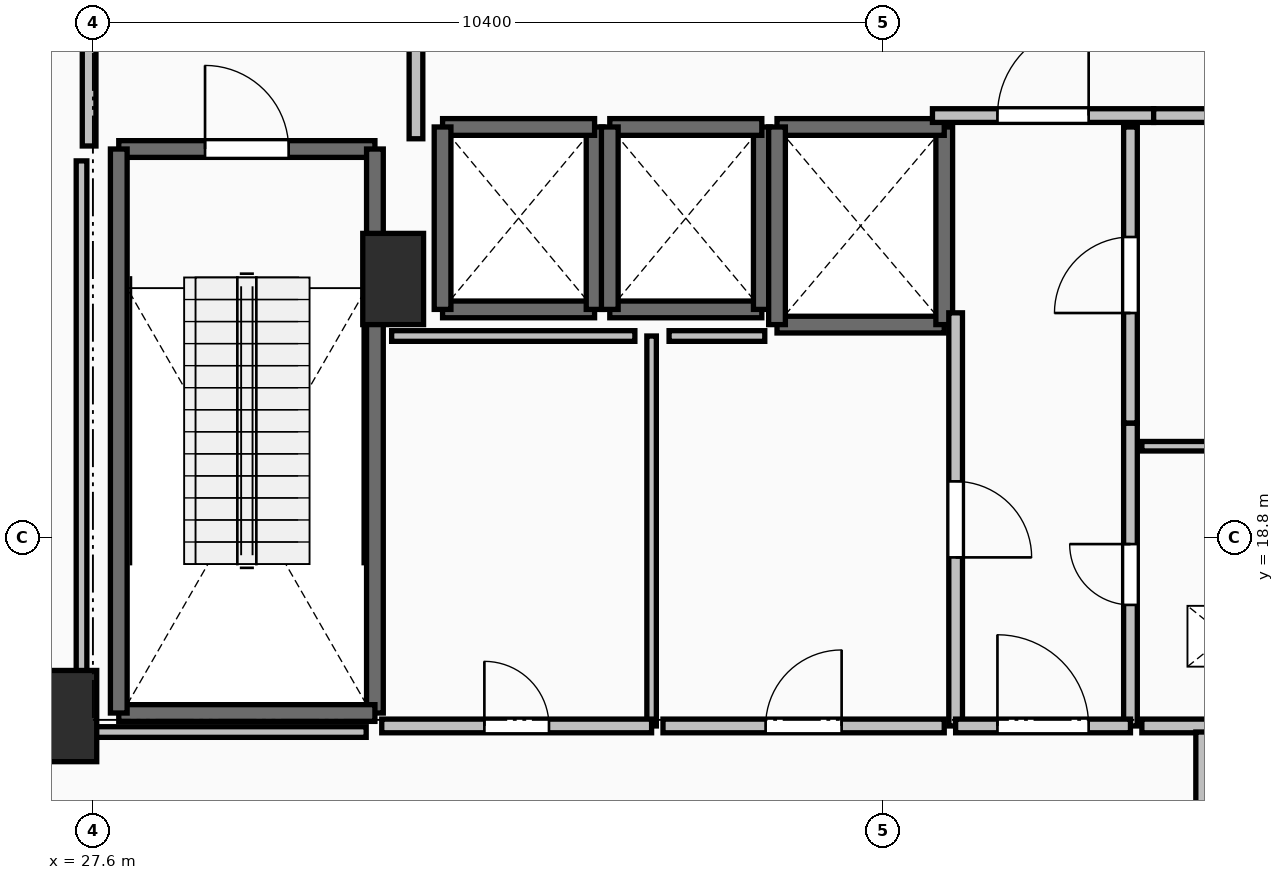
"""IFC4 building model, lengths in metres.
Left out: names, types, materials, properties, quantities, classifications, styles, units other than length and angle.
Written with IfcOpenShell. Run it as: python <this file> out.ifc"""

import sys

from ifc_helpers import new_model, si_unit, direction, frame, frame_2d, origin, origin_2d, place, context, subcontext, project, spatial, rectangle, extrude, element, fill, save


model = new_model("IFC4")
c1 = context("Model", 3, precision=1e-05, world=origin(), true_north=direction((0.0, 1.0)))
c2 = subcontext(c1, "Body", "Model", "MODEL_VIEW")
j1 = project(units=[si_unit("LENGTHUNIT", "METRE"), si_unit("PLANEANGLEUNIT", "RADIAN")], contexts=[c1])
p1 = place(None, origin())
s1 = spatial("IfcSite", under=j1, at=p1, CompositionType="ELEMENT")
p2 = place(p1, origin())
s2 = spatial("IfcBuilding", under=s1, at=p2, CompositionType="ELEMENT")
p3 = place(p2, frame((0.0, 0.0, 14.4)))
s3 = spatial("IfcBuildingStorey", under=s2, at=p3, CompositionType="ELEMENT", Elevation=14.4)
for number, where, z_axis, x_axis in (
    (1, (27.25, 16.45, 0.0), (0.0, 0.0, 1.0), (1.0, 0.0, 0.0)),
    (2, (31.55, 22.2, 0.0), (0.0, 0.0, 1.0), (1.0, 0.0, 0.0)),
):
    element("IfcColumn", number, at=place(p3, frame(where, z_axis=z_axis, x_axis=x_axis)), inside=s3, PredefinedType="PILASTER", context=c2, shape_type="SweptSolid", body=[
        extrude(rectangle(XDim=0.8, YDim=1.2, at=origin_2d()), origin(), (0.0, 0.0, 1.0), 4.8),
    ])
p4 = place(p3, frame((27.94, 23.91, 0.0), z_axis=(0.0, 0.0, 1.0), x_axis=(1.0, 0.0, 0.0)))
e3 = element("IfcWall", 3, at=p4, inside=s3, PredefinedType="SOLIDWALL", context=c2, shape_type="SweptSolid", body=[
    extrude(rectangle(XDim=3.37, YDim=0.22, at=frame_2d((1.685, 0.0))), origin(), (0.0, 0.0, 1.0), 4.48),
])
p5 = place(p4, frame((1.135, 0.0, 0.0)))
e4 = element("IfcOpeningElement", 4, at=p5, cuts=e3, PredefinedType="OPENING", context=c2, shape_type="SweptSolid", body=[
    extrude(rectangle(XDim=1.1, YDim=2.15, at=frame_2d((0.55, 1.075))), frame((0.0, 0.125, 0.0), z_axis=(0.0, -1.0, 0.0), x_axis=(1.0, 0.0, 0.0)), (0.0, 0.0, 1.0), 0.25),
])
p6 = place(p3, frame((31.31, 23.91, 0.0), z_axis=(0.0, 0.0, 1.0), x_axis=(0.0, -1.0, 0.0)))
e5 = element("IfcWall", 5, at=p6, inside=s3, PredefinedType="SOLIDWALL", context=c2, shape_type="SweptSolid", body=[
    extrude(rectangle(XDim=7.42, YDim=0.22, at=frame_2d((3.71, 0.0))), origin(), (0.0, 0.0, 1.0), 4.48),
])
p7 = place(p3, frame((31.31, 16.49, 0.0), z_axis=(0.0, 0.0, 1.0), x_axis=(-1.0, 0.0, 0.0)))
e6 = element("IfcWall", 6, at=p7, inside=s3, PredefinedType="SOLIDWALL", context=c2, shape_type="SweptSolid", body=[
    extrude(rectangle(XDim=3.37, YDim=0.22, at=frame_2d((1.685, 0.0))), origin(), (0.0, 0.0, 1.0), 4.48),
])
p8 = place(p3, frame((27.94, 16.49, 0.0), z_axis=(0.0, 0.0, 1.0), x_axis=(0.0, 1.0, 0.0)))
e7 = element("IfcWall", 7, at=p8, inside=s3, PredefinedType="SOLIDWALL", context=c2, shape_type="SweptSolid", body=[
    extrude(rectangle(XDim=7.42, YDim=0.22, at=frame_2d((3.71, 0.0))), origin(), (0.0, 0.0, 1.0), 4.48),
])
p9 = place(p3, frame((32.2, 21.8, 0.0), z_axis=(0.0, 0.0, 1.0), x_axis=(1.0, 0.0, 0.0)))
e8 = element("IfcWall", 8, at=p9, inside=s3, PredefinedType="SOLIDWALL", context=c2, shape_type="SweptSolid", body=[
    extrude(rectangle(XDim=2.0, YDim=0.22, at=frame_2d((1.0, 0.0))), origin(), (0.0, 0.0, 1.0), 4.48),
])
p10 = place(p3, frame((34.2, 21.8, 0.0), z_axis=(0.0, 0.0, 1.0), x_axis=(0.0, 1.0, 0.0)))
e9 = element("IfcWall", 9, at=p10, inside=s3, PredefinedType="SOLIDWALL", context=c2, shape_type="SweptSolid", body=[
    extrude(rectangle(XDim=2.4, YDim=0.22, at=frame_2d((1.2, 0.0))), origin(), (0.0, 0.0, 1.0), 4.48),
])
p11 = place(p3, frame((34.2, 24.2, 0.0), z_axis=(0.0, 0.0, 1.0), x_axis=(-1.0, 0.0, 0.0)))
e10 = element("IfcWall", 10, at=p11, inside=s3, PredefinedType="SOLIDWALL", context=c2, shape_type="SweptSolid", body=[
    extrude(rectangle(XDim=2.0, YDim=0.22, at=frame_2d((1.0, 0.0))), origin(), (0.0, 0.0, 1.0), 4.48),
])
p12 = place(p3, frame((32.2, 24.2, 0.0), z_axis=(0.0, 0.0, 1.0), x_axis=(0.0, -1.0, 0.0)))
e11 = element("IfcWall", 11, at=p12, inside=s3, PredefinedType="SOLIDWALL", context=c2, shape_type="SweptSolid", body=[
    extrude(rectangle(XDim=2.4, YDim=0.22, at=frame_2d((1.2, 0.0))), origin(), (0.0, 0.0, 1.0), 4.48),
])
p13 = place(p3, frame((34.4, 21.8, 0.0), z_axis=(0.0, 0.0, 1.0), x_axis=(1.0, 0.0, 0.0)))
e12 = element("IfcWall", 12, at=p13, inside=s3, PredefinedType="SOLIDWALL", context=c2, shape_type="SweptSolid", body=[
    extrude(rectangle(XDim=2.0, YDim=0.22, at=frame_2d((1.0, 0.0))), origin(), (0.0, 0.0, 1.0), 4.48),
])
p14 = place(p3, frame((36.4, 21.8, 0.0), z_axis=(0.0, 0.0, 1.0), x_axis=(0.0, 1.0, 0.0)))
e13 = element("IfcWall", 13, at=p14, inside=s3, PredefinedType="SOLIDWALL", context=c2, shape_type="SweptSolid", body=[
    extrude(rectangle(XDim=2.4, YDim=0.22, at=frame_2d((1.2, 0.0))), origin(), (0.0, 0.0, 1.0), 4.48),
])
p15 = place(p3, frame((36.4, 24.2, 0.0), z_axis=(0.0, 0.0, 1.0), x_axis=(-1.0, 0.0, 0.0)))
e14 = element("IfcWall", 14, at=p15, inside=s3, PredefinedType="SOLIDWALL", context=c2, shape_type="SweptSolid", body=[
    extrude(rectangle(XDim=2.0, YDim=0.22, at=frame_2d((1.0, 0.0))), origin(), (0.0, 0.0, 1.0), 4.48),
])
p16 = place(p3, frame((34.4, 24.2, 0.0), z_axis=(0.0, 0.0, 1.0), x_axis=(0.0, -1.0, 0.0)))
e15 = element("IfcWall", 15, at=p16, inside=s3, PredefinedType="SOLIDWALL", context=c2, shape_type="SweptSolid", body=[
    extrude(rectangle(XDim=2.4, YDim=0.22, at=frame_2d((1.2, 0.0))), origin(), (0.0, 0.0, 1.0), 4.48),
])
p17 = place(p3, frame((36.6, 21.6, 0.0), z_axis=(0.0, 0.0, 1.0), x_axis=(1.0, 0.0, 0.0)))
e16 = element("IfcWall", 16, at=p17, inside=s3, PredefinedType="SOLIDWALL", context=c2, shape_type="SweptSolid", body=[
    extrude(rectangle(XDim=2.2, YDim=0.22, at=frame_2d((1.1, 0.0))), origin(), (0.0, 0.0, 1.0), 4.48),
])
p18 = place(p3, frame((38.8, 21.6, 0.0), z_axis=(0.0, 0.0, 1.0), x_axis=(0.0, 1.0, 0.0)))
e17 = element("IfcWall", 17, at=p18, inside=s3, PredefinedType="SOLIDWALL", context=c2, shape_type="SweptSolid", body=[
    extrude(rectangle(XDim=2.6, YDim=0.22, at=frame_2d((1.3, 0.0))), origin(), (0.0, 0.0, 1.0), 4.48),
])
p19 = place(p3, frame((38.8, 24.2, 0.0), z_axis=(0.0, 0.0, 1.0), x_axis=(-1.0, 0.0, 0.0)))
e18 = element("IfcWall", 18, at=p19, inside=s3, PredefinedType="SOLIDWALL", context=c2, shape_type="SweptSolid", body=[
    extrude(rectangle(XDim=2.2, YDim=0.22, at=frame_2d((1.1, 0.0))), origin(), (0.0, 0.0, 1.0), 4.48),
])
p20 = place(p3, frame((36.6, 24.2, 0.0), z_axis=(0.0, 0.0, 1.0), x_axis=(0.0, -1.0, 0.0)))
e19 = element("IfcWall", 19, at=p20, inside=s3, PredefinedType="SOLIDWALL", context=c2, shape_type="SweptSolid", body=[
    extrude(rectangle(XDim=2.6, YDim=0.22, at=frame_2d((1.3, 0.0))), origin(), (0.0, 0.0, 1.0), 4.48),
])
p21 = place(p3, frame((31.85, 24.045, 0.0), z_axis=(0.0, 0.0, 1.0), x_axis=(0.0, 1.0, 0.0)))
e20 = element("IfcWall", 20, at=p21, inside=s3, PredefinedType="PARTITIONING", context=c2, shape_type="SweptSolid", body=[
    extrude(rectangle(XDim=3.91, YDim=0.18, at=frame_2d((1.955, 0.0))), origin(), (0.0, 0.0, 1.0), 4.48),
])
p22 = place(p21, frame((1.355, 0.0, 0.0)))
e21 = element("IfcOpeningElement", 21, at=p22, cuts=e20, PredefinedType="OPENING", context=c2, shape_type="SweptSolid", body=[
    extrude(rectangle(XDim=1.2, YDim=2.15, at=frame_2d((0.6, 1.075))), frame((0.0, 0.105, 0.0), z_axis=(0.0, -1.0, 0.0), x_axis=(1.0, 0.0, 0.0)), (0.0, 0.0, 1.0), 0.21),
])
p23 = place(p3, frame((27.55, 28.0, 0.0), z_axis=(0.0, 0.0, 1.0), x_axis=(0.0, -1.0, 0.0)))
e22 = element("IfcWall", 22, at=p23, inside=s3, PredefinedType="PARTITIONING", context=c2, shape_type="SweptSolid", body=[
    extrude(rectangle(XDim=4.05, YDim=0.18, at=frame_2d((2.025, 0.0))), origin(), (0.0, 0.0, 1.0), 4.48),
])
p24 = place(p23, frame((1.425, 0.0, 0.0)))
e23 = element("IfcOpeningElement", 23, at=p24, cuts=e22, PredefinedType="OPENING", context=c2, shape_type="SweptSolid", body=[
    extrude(rectangle(XDim=1.2, YDim=2.15, at=frame_2d((0.6, 1.075))), frame((0.0, 0.105, 0.0), z_axis=(0.0, -1.0, 0.0), x_axis=(1.0, 0.0, 0.0)), (0.0, 0.0, 1.0), 0.21),
])
p25 = place(p3, frame((38.645, 24.35, 0.0), z_axis=(0.0, 0.0, 1.0), x_axis=(1.0, 0.0, 0.0)))
e24 = element("IfcWall", 24, at=p25, inside=s3, PredefinedType="PARTITIONING", context=c2, shape_type="SweptSolid", body=[
    extrude(rectangle(XDim=2.91, YDim=0.18, at=frame_2d((1.455, 0.0))), origin(), (0.0, 0.0, 1.0), 4.48),
])
p26 = place(p25, frame((0.855, 0.0, 0.0)))
e25 = element("IfcOpeningElement", 25, at=p26, cuts=e24, PredefinedType="OPENING", context=c2, shape_type="SweptSolid", body=[
    extrude(rectangle(XDim=1.2, YDim=2.15, at=frame_2d((0.6, 1.075))), frame((0.0, 0.105, 0.0), z_axis=(0.0, -1.0, 0.0), x_axis=(1.0, 0.0, 0.0)), (0.0, 0.0, 1.0), 0.21),
])
p27 = place(p3, frame((41.555, 24.35, 0.0), z_axis=(0.0, 0.0, 1.0), x_axis=(1.0, 0.0, 0.0)))
e26 = element("IfcWall", 26, at=p27, inside=s3, PredefinedType="PARTITIONING", context=c2, shape_type="SweptSolid", body=[
    extrude(rectangle(XDim=2.445, YDim=0.18, at=frame_2d((1.223, 0.0))), origin(), (0.0, 0.0, 1.0), 4.48),
])
p28 = place(p27, frame((0.722, 0.0, 0.0)))
e27 = element("IfcOpeningElement", 27, at=p28, cuts=e26, PredefinedType="OPENING", context=c2, shape_type="SweptSolid", body=[
    extrude(rectangle(XDim=1.0, YDim=2.15, at=frame_2d((0.5, 1.075))), frame((0.0, 0.105, 0.0), z_axis=(0.0, -1.0, 0.0), x_axis=(1.0, 0.0, 0.0)), (0.0, 0.0, 1.0), 0.21),
])
p29 = place(p3, frame((41.25, 16.32, 0.0), z_axis=(0.0, 0.0, 1.0), x_axis=(0.0, 1.0, 0.0)))
e28 = element("IfcWall", 28, at=p29, inside=s3, PredefinedType="PARTITIONING", context=c2, shape_type="SweptSolid", body=[
    extrude(rectangle(XDim=3.985, YDim=0.18, at=frame_2d((1.992, 0.0))), origin(), (0.0, 0.0, 1.0), 4.48),
])
p30 = place(p29, frame((1.593, 0.0, 0.0)))
e29 = element("IfcOpeningElement", 29, at=p30, cuts=e28, PredefinedType="OPENING", context=c2, shape_type="SweptSolid", body=[
    extrude(rectangle(XDim=0.8, YDim=2.05, at=frame_2d((0.4, 1.025))), frame((0.0, 0.105, 0.0), z_axis=(0.0, -1.0, 0.0), x_axis=(1.0, 0.0, 0.0)), (0.0, 0.0, 1.0), 0.21),
])
p31 = place(p3, frame((41.25, 20.305, 0.0), z_axis=(0.0, 0.0, 1.0), x_axis=(0.0, 1.0, 0.0)))
e30 = element("IfcWall", 30, at=p31, inside=s3, PredefinedType="PARTITIONING", context=c2, shape_type="SweptSolid", body=[
    extrude(rectangle(XDim=3.895, YDim=0.18, at=frame_2d((1.948, 0.0))), origin(), (0.0, 0.0, 1.0), 4.48),
])
p32 = place(p31, frame((1.448, 0.0, 0.0)))
e31 = element("IfcOpeningElement", 31, at=p32, cuts=e30, PredefinedType="OPENING", context=c2, shape_type="SweptSolid", body=[
    extrude(rectangle(XDim=1.0, YDim=2.15, at=frame_2d((0.5, 1.075))), frame((0.0, 0.105, 0.0), z_axis=(0.0, -1.0, 0.0), x_axis=(1.0, 0.0, 0.0)), (0.0, 0.0, 1.0), 0.21),
])
p33 = place(p3, frame((38.95, 21.755, 0.0), z_axis=(0.0, 0.0, 1.0), x_axis=(0.0, -1.0, 0.0)))
e32 = element("IfcWall", 32, at=p33, inside=s3, PredefinedType="PARTITIONING", context=c2, shape_type="SweptSolid", body=[
    extrude(rectangle(XDim=5.435, YDim=0.18, at=frame_2d((2.717, 0.0))), origin(), (0.0, 0.0, 1.0), 4.48),
])
p34 = place(p33, frame((2.218, 0.0, 0.0)))
e33 = element("IfcOpeningElement", 33, at=p34, cuts=e32, PredefinedType="OPENING", context=c2, shape_type="SweptSolid", body=[
    extrude(rectangle(XDim=1.0, YDim=2.15, at=frame_2d((0.5, 1.075))), frame((0.0, 0.105, 0.0), z_axis=(0.0, -1.0, 0.0), x_axis=(1.0, 0.0, 0.0)), (0.0, 0.0, 1.0), 0.21),
])
p35 = place(p3, frame((38.95, 16.32, 0.0), z_axis=(0.0, 0.0, 1.0), x_axis=(1.0, 0.0, 0.0)))
e34 = element("IfcWall", 34, at=p35, inside=s3, PredefinedType="PARTITIONING", context=c2, shape_type="SweptSolid", body=[
    extrude(rectangle(XDim=2.3, YDim=0.18, at=frame_2d((1.15, 0.0))), origin(), (0.0, 0.0, 1.0), 4.48),
])
p36 = place(p35, frame((0.55, 0.0, 0.0)))
e35 = element("IfcOpeningElement", 35, at=p36, cuts=e34, PredefinedType="OPENING", context=c2, shape_type="SweptSolid", body=[
    extrude(rectangle(XDim=1.2, YDim=2.15, at=frame_2d((0.6, 1.075))), frame((0.0, 0.105, 0.0), z_axis=(0.0, -1.0, 0.0), x_axis=(1.0, 0.0, 0.0)), (0.0, 0.0, 1.0), 0.21),
])
p37 = place(p3, frame((44.6, 20.0, 0.0), z_axis=(0.0, 0.0, 1.0), x_axis=(-1.0, 0.0, 0.0)))
e36 = element("IfcWall", 36, at=p37, inside=s3, PredefinedType="PARTITIONING", context=c2, shape_type="SweptSolid", body=[
    extrude(rectangle(XDim=3.2, YDim=0.125, at=frame_2d((1.6, 0.0))), origin(), (0.0, 0.0, 1.0), 4.48),
])
p38 = place(p3, frame((41.4, 16.32, 0.0), z_axis=(0.0, 0.0, 1.0), x_axis=(1.0, 0.0, 0.0)))
e37 = element("IfcWall", 37, at=p38, inside=s3, PredefinedType="PARTITIONING", context=c2, shape_type="SweptSolid", body=[
    extrude(rectangle(XDim=3.2, YDim=0.18, at=frame_2d((1.6, 0.0))), origin(), (0.0, 0.0, 1.0), 4.48),
])
p39 = place(p38, frame((1.2, 0.0, 0.0)))
e38 = element("IfcOpeningElement", 38, at=p39, cuts=e37, PredefinedType="OPENING", context=c2, shape_type="SweptSolid", body=[
    extrude(rectangle(XDim=0.8, YDim=2.05, at=frame_2d((0.4, 1.025))), frame((0.0, 0.105, 0.0), z_axis=(0.0, -1.0, 0.0), x_axis=(1.0, 0.0, 0.0)), (0.0, 0.0, 1.0), 0.21),
])
p40 = place(p3, frame((34.95, 16.32, 0.0), z_axis=(0.0, 0.0, 1.0), x_axis=(0.0, 1.0, 0.0)))
e39 = element("IfcWall", 39, at=p40, inside=s3, PredefinedType="PARTITIONING", context=c2, shape_type="SweptSolid", body=[
    extrude(rectangle(XDim=5.13, YDim=0.125, at=frame_2d((2.565, 0.0))), origin(), (0.0, 0.0, 1.0), 4.48),
])
p41 = place(p3, frame((31.4, 16.32, 0.0), z_axis=(0.0, 0.0, 1.0), x_axis=(1.0, 0.0, 0.0)))
e40 = element("IfcWall", 40, at=p41, inside=s3, PredefinedType="PARTITIONING", context=c2, shape_type="SweptSolid", body=[
    extrude(rectangle(XDim=3.55, YDim=0.18, at=frame_2d((1.775, 0.0))), origin(), (0.0, 0.0, 1.0), 4.48),
])
p42 = place(p41, frame((1.35, 0.0, 0.0)))
e41 = element("IfcOpeningElement", 41, at=p42, cuts=e40, PredefinedType="OPENING", context=c2, shape_type="SweptSolid", body=[
    extrude(rectangle(XDim=0.85, YDim=2.1, at=frame_2d((0.425, 1.05))), frame((0.0, 0.105, 0.0), z_axis=(0.0, -1.0, 0.0), x_axis=(1.0, 0.0, 0.0)), (0.0, 0.0, 1.0), 0.21),
])
p43 = place(p3, frame((35.1, 16.32, 0.0), z_axis=(0.0, 0.0, 1.0), x_axis=(1.0, 0.0, 0.0)))
e42 = element("IfcWall", 42, at=p43, inside=s3, PredefinedType="PARTITIONING", context=c2, shape_type="SweptSolid", body=[
    extrude(rectangle(XDim=3.7, YDim=0.18, at=frame_2d((1.85, 0.0))), origin(), (0.0, 0.0, 1.0), 4.48),
])
p44 = place(p43, frame((1.35, 0.0, 0.0)))
e43 = element("IfcOpeningElement", 43, at=p44, cuts=e42, PredefinedType="OPENING", context=c2, shape_type="SweptSolid", body=[
    extrude(rectangle(XDim=1.0, YDim=2.15, at=frame_2d((0.5, 1.075))), frame((0.0, 0.105, 0.0), z_axis=(0.0, -1.0, 0.0), x_axis=(1.0, 0.0, 0.0)), (0.0, 0.0, 1.0), 0.21),
])
p45 = place(p3, frame((42.2, 14.1, 0.0), z_axis=(0.0, 0.0, 1.0), x_axis=(0.0, 1.0, 0.0)))
e44 = element("IfcWall", 44, at=p45, inside=s3, PredefinedType="PARTITIONING", context=c2, shape_type="SweptSolid", body=[
    extrude(rectangle(XDim=2.14, YDim=0.18, at=frame_2d((1.07, 0.0))), origin(), (0.0, 0.0, 1.0), 4.48),
])
p46 = place(p3, frame((34.73, 21.45, 0.0), z_axis=(0.0, 0.0, 1.0), x_axis=(-1.0, 0.0, 0.0)))
e45 = element("IfcWall", 45, at=p46, inside=s3, PredefinedType="PARTITIONING", context=c2, shape_type="SweptSolid", body=[
    extrude(rectangle(XDim=3.2, YDim=0.14, at=frame_2d((1.6, 0.0))), origin(), (0.0, 0.0, 1.0), 4.48),
])
p47 = place(p3, frame((36.439, 21.45, 0.0), z_axis=(0.0, 0.0, 1.0), x_axis=(-1.0, 0.0, 0.0)))
e46 = element("IfcWall", 46, at=p47, inside=s3, PredefinedType="PARTITIONING", context=c2, shape_type="SweptSolid", body=[
    extrude(rectangle(XDim=1.259, YDim=0.14, at=frame_2d((0.629, 0.0))), origin(), (0.0, 0.0, 1.0), 4.48),
])
p48 = place(p3, frame((31.195, 16.24, 0.0), z_axis=(0.0, 0.0, 1.0), x_axis=(-1.0, 0.0, 0.0)))
e47 = element("IfcWall", 47, at=p48, inside=s3, PredefinedType="PARTITIONING", context=c2, shape_type="SweptSolid", body=[
    extrude(rectangle(XDim=3.745, YDim=0.14, at=frame_2d((1.873, 0.0))), origin(), (0.0, 0.0, 1.0), 3.672),
])
p49 = place(p3, frame((27.45, 16.24, 0.0), z_axis=(0.0, 0.0, 1.0), x_axis=(0.0, 1.0, 0.0)))
e48 = element("IfcWall", 48, at=p49, inside=s3, PredefinedType="PARTITIONING", context=c2, shape_type="SweptSolid", body=[
    extrude(rectangle(XDim=7.514, YDim=0.14, at=frame_2d((3.757, 0.0))), origin(), (0.0, 0.0, 1.0), 2.406),
])
p50 = place(p5, origin())
e49 = element("IfcDoor", 49, at=p50, inside=s3, OperationType="SINGLE_SWING_LEFT", PredefinedType="DOOR", context=c2, shape_type="SweptSolid", body=[
    extrude(rectangle(XDim=1.1, YDim=2.15, at=frame_2d((0.55, 1.075))), frame((0.0, 0.025, 0.0), z_axis=(0.0, -1.0, 0.0), x_axis=(1.0, 0.0, 0.0)), (0.0, 0.0, 1.0), 0.05),
])
fill(e4, e49)
p51 = place(p26, origin())
e50 = element("IfcDoor", 50, at=p51, inside=s3, OperationType="SINGLE_SWING_RIGHT", PredefinedType="DOOR", context=c2, shape_type="SweptSolid", body=[
    extrude(rectangle(XDim=1.2, YDim=2.15, at=frame_2d((0.6, 1.075))), frame((0.0, 0.025, 0.0), z_axis=(0.0, -1.0, 0.0), x_axis=(1.0, 0.0, 0.0)), (0.0, 0.0, 1.0), 0.05),
])
fill(e25, e50)
p52 = place(p30, origin())
e51 = element("IfcDoor", 51, at=p52, inside=s3, OperationType="SINGLE_SWING_RIGHT", PredefinedType="DOOR", context=c2, shape_type="SweptSolid", body=[
    extrude(rectangle(XDim=0.8, YDim=2.05, at=frame_2d((0.4, 1.025))), frame((0.0, 0.025, 0.0), z_axis=(0.0, -1.0, 0.0), x_axis=(1.0, 0.0, 0.0)), (0.0, 0.0, 1.0), 0.05),
])
fill(e29, e51)
p53 = place(p32, origin())
e52 = element("IfcDoor", 52, at=p53, inside=s3, OperationType="SINGLE_SWING_LEFT", PredefinedType="DOOR", context=c2, shape_type="SweptSolid", body=[
    extrude(rectangle(XDim=1.0, YDim=2.15, at=frame_2d((0.5, 1.075))), frame((0.0, 0.025, 0.0), z_axis=(0.0, -1.0, 0.0), x_axis=(1.0, 0.0, 0.0)), (0.0, 0.0, 1.0), 0.05),
])
fill(e31, e52)
p54 = place(p34, origin())
e53 = element("IfcDoor", 53, at=p54, inside=s3, OperationType="SINGLE_SWING_RIGHT", PredefinedType="DOOR", context=c2, shape_type="SweptSolid", body=[
    extrude(rectangle(XDim=1.0, YDim=2.15, at=frame_2d((0.5, 1.075))), frame((0.0, 0.025, 0.0), z_axis=(0.0, -1.0, 0.0), x_axis=(1.0, 0.0, 0.0)), (0.0, 0.0, 1.0), 0.05),
])
fill(e33, e53)
p55 = place(p36, origin())
e54 = element("IfcDoor", 54, at=p55, inside=s3, OperationType="SINGLE_SWING_LEFT", PredefinedType="DOOR", context=c2, shape_type="SweptSolid", body=[
    extrude(rectangle(XDim=1.2, YDim=2.15, at=frame_2d((0.6, 1.075))), frame((0.0, 0.025, 0.0), z_axis=(0.0, -1.0, 0.0), x_axis=(1.0, 0.0, 0.0)), (0.0, 0.0, 1.0), 0.05),
])
fill(e35, e54)
p56 = place(p42, origin())
e55 = element("IfcDoor", 55, at=p56, inside=s3, OperationType="SINGLE_SWING_LEFT", PredefinedType="DOOR", context=c2, shape_type="SweptSolid", body=[
    extrude(rectangle(XDim=0.85, YDim=2.1, at=frame_2d((0.425, 1.05))), frame((0.0, 0.025, 0.0), z_axis=(0.0, -1.0, 0.0), x_axis=(1.0, 0.0, 0.0)), (0.0, 0.0, 1.0), 0.05),
])
fill(e41, e55)
p57 = place(p44, origin())
e56 = element("IfcDoor", 56, at=p57, inside=s3, OperationType="SINGLE_SWING_RIGHT", PredefinedType="DOOR", context=c2, shape_type="SweptSolid", body=[
    extrude(rectangle(XDim=1.0, YDim=2.15, at=frame_2d((0.5, 1.075))), frame((0.0, 0.025, 0.0), z_axis=(0.0, -1.0, 0.0), x_axis=(1.0, 0.0, 0.0)), (0.0, 0.0, 1.0), 0.05),
])
fill(e43, e56)
save(model, sys.argv[1])
